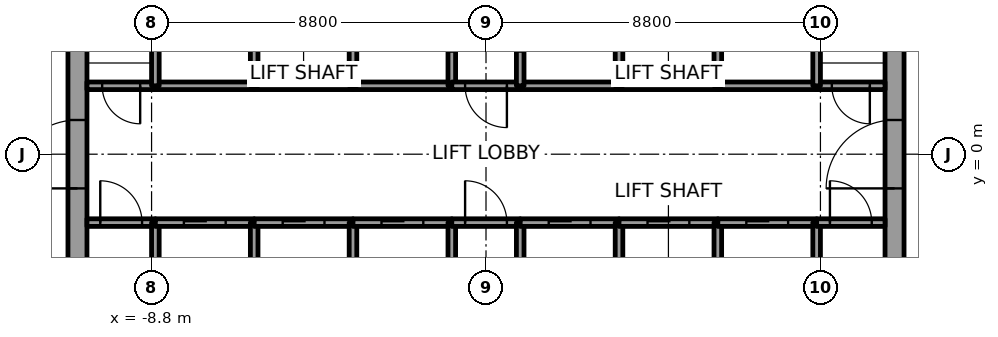
"""IFC4 building model, lengths in metres.
Left out: names, types, materials, properties, quantities, classifications, styles, units other than length and angle.
Written with IfcOpenShell. Run it as: python <this file> out.ifc"""

import sys

from ifc_helpers import new_model, si_unit, direction, frame, frame_2d, origin, place, context, subcontext, project, spatial, rectangle, extrude, element, fill, save


model = new_model("IFC4")
c1 = context("Model", 3, precision=1e-05, world=origin(), true_north=direction((0.0, 1.0)))
c2 = subcontext(c1, "Body", "Model", "MODEL_VIEW")
j1 = project(units=[si_unit("LENGTHUNIT", "METRE"), si_unit("PLANEANGLEUNIT", "RADIAN")], contexts=[c1])
p1 = place(None, origin())
s1 = spatial("IfcSite", under=j1, at=p1, CompositionType="ELEMENT")
p2 = place(p1, origin())
s2 = spatial("IfcBuilding", under=s1, at=p2, CompositionType="ELEMENT")
p3 = place(p2, frame((0.0, 0.0, 81.3)))
s3 = spatial("IfcBuildingStorey", under=s2, at=p3, CompositionType="ELEMENT", Elevation=81.3)
p4 = place(p3, frame((-10.75, -7.5, 0.0), z_axis=(0.0, 0.0, 1.0), x_axis=(0.0, 1.0, 0.0)))
e1 = element("IfcWall", 1, at=p4, inside=s3, PredefinedType="SHEAR", context=c2, shape_type="SweptSolid", body=[
    extrude(rectangle(XDim=15.0, YDim=0.5, at=frame_2d((7.5, 0.0))), origin(), (0.0, 0.0, 1.0), 3.7),
])
p5 = place(p4, frame((6.6, 0.0, 0.0)))
e2 = element("IfcOpeningElement", 2, at=p5, cuts=e1, PredefinedType="OPENING", context=c2, shape_type="SweptSolid", body=[
    extrude(rectangle(XDim=1.8, YDim=2.1, at=frame_2d((0.9, 1.05))), frame((0.0, 0.25, 0.0), z_axis=(0.0, -1.0, 0.0), x_axis=(1.0, 0.0, 0.0)), (0.0, 0.0, 1.0), 0.5),
])
p6 = place(p3, frame((10.75, -7.5, 0.0), z_axis=(0.0, 0.0, 1.0), x_axis=(0.0, 1.0, 0.0)))
e3 = element("IfcWall", 3, at=p6, inside=s3, PredefinedType="SHEAR", context=c2, shape_type="SweptSolid", body=[
    extrude(rectangle(XDim=15.0, YDim=0.5, at=frame_2d((7.5, 0.0))), origin(), (0.0, 0.0, 1.0), 3.7),
])
p7 = place(p6, frame((6.6, 0.0, 0.0)))
e4 = element("IfcOpeningElement", 4, at=p7, cuts=e3, PredefinedType="OPENING", context=c2, shape_type="SweptSolid", body=[
    extrude(rectangle(XDim=1.8, YDim=2.1, at=frame_2d((0.9, 1.05))), frame((0.0, 0.25, 0.0), z_axis=(0.0, -1.0, 0.0), x_axis=(1.0, 0.0, 0.0)), (0.0, 0.0, 1.0), 0.5),
])
p8 = place(p3, frame((-10.5, -1.8, 0.0), z_axis=(0.0, 0.0, 1.0), x_axis=(1.0, 0.0, 0.0)))
e5 = element("IfcWall", 5, at=p8, inside=s3, PredefinedType="SOLIDWALL", context=c2, shape_type="SweptSolid", body=[
    extrude(rectangle(XDim=1.8, YDim=0.2, at=frame_2d((0.9, 0.0))), origin(), (0.0, 0.0, 1.0), 3.55),
])
p9 = place(p8, frame((0.35, 0.0, 0.0)))
e6 = element("IfcOpeningElement", 6, at=p9, cuts=e5, PredefinedType="OPENING", context=c2, shape_type="SweptSolid", body=[
    extrude(rectangle(XDim=1.1, YDim=2.1, at=frame_2d((0.55, 1.05))), frame((0.0, 0.1, 0.0), z_axis=(0.0, -1.0, 0.0), x_axis=(1.0, 0.0, 0.0)), (0.0, 0.0, 1.0), 0.2),
])
p10 = place(p3, frame((-8.7, 1.8, 0.0), z_axis=(0.0, 0.0, 1.0), x_axis=(-1.0, 0.0, 0.0)))
e7 = element("IfcWall", 7, at=p10, inside=s3, PredefinedType="SOLIDWALL", context=c2, shape_type="SweptSolid", body=[
    extrude(rectangle(XDim=1.8, YDim=0.2, at=frame_2d((0.9, 0.0))), origin(), (0.0, 0.0, 1.0), 3.55),
])
p11 = place(p10, frame((0.4, 0.0, 0.0)))
e8 = element("IfcOpeningElement", 8, at=p11, cuts=e7, PredefinedType="OPENING", context=c2, shape_type="SweptSolid", body=[
    extrude(rectangle(XDim=1.0, YDim=2.1, at=frame_2d((0.5, 1.05))), frame((0.0, 0.1, 0.0), z_axis=(0.0, -1.0, 0.0), x_axis=(1.0, 0.0, 0.0)), (0.0, 0.0, 1.0), 0.2),
])
p12 = place(p3, frame((-8.7, -4.6, 0.0), z_axis=(0.0, 0.0, 1.0), x_axis=(0.0, 1.0, 0.0)))
e9 = element("IfcWall", 9, at=p12, inside=s3, PredefinedType="SOLIDWALL", context=c2, shape_type="SweptSolid", body=[
    extrude(rectangle(XDim=2.8, YDim=0.2, at=frame_2d((1.4, 0.0))), origin(), (0.0, 0.0, 1.0), 3.55),
])
p13 = place(p3, frame((-8.7, -1.8, 0.0), z_axis=(0.0, 0.0, 1.0), x_axis=(1.0, 0.0, 0.0)))
e10 = element("IfcWall", 10, at=p13, inside=s3, PredefinedType="SOLIDWALL", context=c2, shape_type="SweptSolid", body=[
    extrude(rectangle(XDim=2.6, YDim=0.2, at=frame_2d((1.3, 0.0))), origin(), (0.0, 0.0, 1.0), 3.55),
])
p14 = place(p13, frame((0.75, 0.0, 0.0)))
e11 = element("IfcOpeningElement", 11, at=p14, cuts=e10, PredefinedType="OPENING", context=c2, shape_type="SweptSolid", body=[
    extrude(rectangle(XDim=1.1, YDim=2.1, at=frame_2d((0.55, 1.05))), frame((0.0, 0.1, 0.0), z_axis=(0.0, -1.0, 0.0), x_axis=(1.0, 0.0, 0.0)), (0.0, 0.0, 1.0), 0.2),
])
p15 = place(p3, frame((-6.1, 1.8, 0.0), z_axis=(0.0, 0.0, 1.0), x_axis=(-1.0, 0.0, 0.0)))
e12 = element("IfcWall", 12, at=p15, inside=s3, PredefinedType="SOLIDWALL", context=c2, shape_type="SweptSolid", body=[
    extrude(rectangle(XDim=2.6, YDim=0.2, at=frame_2d((1.3, 0.0))), origin(), (0.0, 0.0, 1.0), 3.55),
])
for number, where, z_axis, x_axis in (
    (13, (-8.7, 1.8, 0.0), (0.0, 0.0, 1.0), (0.0, 1.0, 0.0)),
    (14, (-6.1, -4.6, 0.0), (0.0, 0.0, 1.0), (0.0, 1.0, 0.0)),
):
    element("IfcWall", number, at=place(p3, frame(where, z_axis=z_axis, x_axis=x_axis)), inside=s3, PredefinedType="SOLIDWALL", context=c2, shape_type="SweptSolid", body=[
        extrude(rectangle(XDim=2.8, YDim=0.2, at=frame_2d((1.4, 0.0))), origin(), (0.0, 0.0, 1.0), 3.55),
    ])
p16 = place(p3, frame((-6.1, -1.8, 0.0), z_axis=(0.0, 0.0, 1.0), x_axis=(1.0, 0.0, 0.0)))
e15 = element("IfcWall", 15, at=p16, inside=s3, PredefinedType="SOLIDWALL", context=c2, shape_type="SweptSolid", body=[
    extrude(rectangle(XDim=2.6, YDim=0.2, at=frame_2d((1.3, 0.0))), origin(), (0.0, 0.0, 1.0), 3.55),
])
p17 = place(p16, frame((0.75, 0.0, 0.0)))
e16 = element("IfcOpeningElement", 16, at=p17, cuts=e15, PredefinedType="OPENING", context=c2, shape_type="SweptSolid", body=[
    extrude(rectangle(XDim=1.1, YDim=2.1, at=frame_2d((0.55, 1.05))), frame((0.0, 0.1, 0.0), z_axis=(0.0, -1.0, 0.0), x_axis=(1.0, 0.0, 0.0)), (0.0, 0.0, 1.0), 0.2),
])
p18 = place(p3, frame((-3.5, 1.8, 0.0), z_axis=(0.0, 0.0, 1.0), x_axis=(-1.0, 0.0, 0.0)))
e17 = element("IfcWall", 17, at=p18, inside=s3, PredefinedType="SOLIDWALL", context=c2, shape_type="SweptSolid", body=[
    extrude(rectangle(XDim=2.6, YDim=0.2, at=frame_2d((1.3, 0.0))), origin(), (0.0, 0.0, 1.0), 3.55),
])
for number, where, z_axis, x_axis in (
    (18, (-6.1, 1.8, 0.0), (0.0, 0.0, 1.0), (0.0, 1.0, 0.0)),
    (19, (-3.5, -4.6, 0.0), (0.0, 0.0, 1.0), (0.0, 1.0, 0.0)),
):
    element("IfcWall", number, at=place(p3, frame(where, z_axis=z_axis, x_axis=x_axis)), inside=s3, PredefinedType="SOLIDWALL", context=c2, shape_type="SweptSolid", body=[
        extrude(rectangle(XDim=2.8, YDim=0.2, at=frame_2d((1.4, 0.0))), origin(), (0.0, 0.0, 1.0), 3.55),
    ])
p19 = place(p3, frame((-3.5, -1.8, 0.0), z_axis=(0.0, 0.0, 1.0), x_axis=(1.0, 0.0, 0.0)))
e20 = element("IfcWall", 20, at=p19, inside=s3, PredefinedType="SOLIDWALL", context=c2, shape_type="SweptSolid", body=[
    extrude(rectangle(XDim=2.6, YDim=0.2, at=frame_2d((1.3, 0.0))), origin(), (0.0, 0.0, 1.0), 3.55),
])
p20 = place(p19, frame((0.75, 0.0, 0.0)))
e21 = element("IfcOpeningElement", 21, at=p20, cuts=e20, PredefinedType="OPENING", context=c2, shape_type="SweptSolid", body=[
    extrude(rectangle(XDim=1.1, YDim=2.1, at=frame_2d((0.55, 1.05))), frame((0.0, 0.1, 0.0), z_axis=(0.0, -1.0, 0.0), x_axis=(1.0, 0.0, 0.0)), (0.0, 0.0, 1.0), 0.2),
])
p21 = place(p3, frame((-0.9, 1.8, 0.0), z_axis=(0.0, 0.0, 1.0), x_axis=(-1.0, 0.0, 0.0)))
e22 = element("IfcWall", 22, at=p21, inside=s3, PredefinedType="SOLIDWALL", context=c2, shape_type="SweptSolid", body=[
    extrude(rectangle(XDim=2.6, YDim=0.2, at=frame_2d((1.3, 0.0))), origin(), (0.0, 0.0, 1.0), 3.55),
])
p22 = place(p3, frame((-3.5, 4.6, 0.0), z_axis=(0.0, 0.0, 1.0), x_axis=(0.0, -1.0, 0.0)))
e23 = element("IfcWall", 23, at=p22, inside=s3, PredefinedType="SOLIDWALL", context=c2, shape_type="SweptSolid", body=[
    extrude(rectangle(XDim=2.8, YDim=0.2, at=frame_2d((1.4, 0.0))), origin(), (0.0, 0.0, 1.0), 3.55),
])
p23 = place(p3, frame((-0.9, 1.8, 0.0), z_axis=(0.0, 0.0, 1.0), x_axis=(0.0, 1.0, 0.0)))
e24 = element("IfcWall", 24, at=p23, inside=s3, PredefinedType="SOLIDWALL", context=c2, shape_type="SweptSolid", body=[
    extrude(rectangle(XDim=3.0, YDim=0.2, at=frame_2d((1.5, 0.0))), origin(), (0.0, 0.0, 1.0), 3.55),
])
p24 = place(p23, frame((0.9, 0.0, 0.0)))
e25 = element("IfcOpeningElement", 25, at=p24, cuts=e24, PredefinedType="OPENING", context=c2, shape_type="SweptSolid", body=[
    extrude(rectangle(XDim=1.2, YDim=2.1, at=frame_2d((0.6, 1.05))), frame((0.0, 0.1, 0.0), z_axis=(0.0, -1.0, 0.0), x_axis=(1.0, 0.0, 0.0)), (0.0, 0.0, 1.0), 0.2),
])
p25 = place(p3, frame((-0.9, -4.6, 0.0), z_axis=(0.0, 0.0, 1.0), x_axis=(0.0, 1.0, 0.0)))
e26 = element("IfcWall", 26, at=p25, inside=s3, PredefinedType="SOLIDWALL", context=c2, shape_type="SweptSolid", body=[
    extrude(rectangle(XDim=2.8, YDim=0.2, at=frame_2d((1.4, 0.0))), origin(), (0.0, 0.0, 1.0), 3.55),
])
p26 = place(p3, frame((-0.9, -1.8, 0.0), z_axis=(0.0, 0.0, 1.0), x_axis=(1.0, 0.0, 0.0)))
e27 = element("IfcWall", 27, at=p26, inside=s3, PredefinedType="SOLIDWALL", context=c2, shape_type="SweptSolid", body=[
    extrude(rectangle(XDim=1.8, YDim=0.2, at=frame_2d((0.9, 0.0))), origin(), (0.0, 0.0, 1.0), 3.55),
])
p27 = place(p26, frame((0.35, 0.0, 0.0)))
e28 = element("IfcOpeningElement", 28, at=p27, cuts=e27, PredefinedType="OPENING", context=c2, shape_type="SweptSolid", body=[
    extrude(rectangle(XDim=1.1, YDim=2.1, at=frame_2d((0.55, 1.05))), frame((0.0, 0.1, 0.0), z_axis=(0.0, -1.0, 0.0), x_axis=(1.0, 0.0, 0.0)), (0.0, 0.0, 1.0), 0.2),
])
p28 = place(p3, frame((0.9, 1.8, 0.0), z_axis=(0.0, 0.0, 1.0), x_axis=(-1.0, 0.0, 0.0)))
e29 = element("IfcWall", 29, at=p28, inside=s3, PredefinedType="SOLIDWALL", context=c2, shape_type="SweptSolid", body=[
    extrude(rectangle(XDim=1.8, YDim=0.2, at=frame_2d((0.9, 0.0))), origin(), (0.0, 0.0, 1.0), 3.55),
])
p29 = place(p28, frame((0.35, 0.0, 0.0)))
e30 = element("IfcOpeningElement", 30, at=p29, cuts=e29, PredefinedType="OPENING", context=c2, shape_type="SweptSolid", body=[
    extrude(rectangle(XDim=1.1, YDim=2.1, at=frame_2d((0.55, 1.05))), frame((0.0, 0.1, 0.0), z_axis=(0.0, -1.0, 0.0), x_axis=(1.0, 0.0, 0.0)), (0.0, 0.0, 1.0), 0.2),
])
p30 = place(p3, frame((0.9, -1.8, 0.0), z_axis=(0.0, 0.0, 1.0), x_axis=(0.0, -1.0, 0.0)))
e31 = element("IfcWall", 31, at=p30, inside=s3, PredefinedType="SOLIDWALL", context=c2, shape_type="SweptSolid", body=[
    extrude(rectangle(XDim=2.8, YDim=0.2, at=frame_2d((1.4, 0.0))), origin(), (0.0, 0.0, 1.0), 3.55),
])
p31 = place(p3, frame((0.9, -1.8, 0.0), z_axis=(0.0, 0.0, 1.0), x_axis=(1.0, 0.0, 0.0)))
e32 = element("IfcWall", 32, at=p31, inside=s3, PredefinedType="SOLIDWALL", context=c2, shape_type="SweptSolid", body=[
    extrude(rectangle(XDim=2.6, YDim=0.2, at=frame_2d((1.3, 0.0))), origin(), (0.0, 0.0, 1.0), 3.55),
])
p32 = place(p31, frame((0.75, 0.0, 0.0)))
e33 = element("IfcOpeningElement", 33, at=p32, cuts=e32, PredefinedType="OPENING", context=c2, shape_type="SweptSolid", body=[
    extrude(rectangle(XDim=1.1, YDim=2.1, at=frame_2d((0.55, 1.05))), frame((0.0, 0.1, 0.0), z_axis=(0.0, -1.0, 0.0), x_axis=(1.0, 0.0, 0.0)), (0.0, 0.0, 1.0), 0.2),
])
p33 = place(p3, frame((3.5, 1.8, 0.0), z_axis=(0.0, 0.0, 1.0), x_axis=(-1.0, 0.0, 0.0)))
e34 = element("IfcWall", 34, at=p33, inside=s3, PredefinedType="SOLIDWALL", context=c2, shape_type="SweptSolid", body=[
    extrude(rectangle(XDim=2.6, YDim=0.2, at=frame_2d((1.3, 0.0))), origin(), (0.0, 0.0, 1.0), 3.55),
])
p34 = place(p3, frame((0.9, 4.8, 0.0), z_axis=(0.0, 0.0, 1.0), x_axis=(0.0, -1.0, 0.0)))
e35 = element("IfcWall", 35, at=p34, inside=s3, PredefinedType="SOLIDWALL", context=c2, shape_type="SweptSolid", body=[
    extrude(rectangle(XDim=3.0, YDim=0.2, at=frame_2d((1.5, 0.0))), origin(), (0.0, 0.0, 1.0), 3.55),
])
p35 = place(p34, frame((0.9, 0.0, 0.0)))
e36 = element("IfcOpeningElement", 36, at=p35, cuts=e35, PredefinedType="OPENING", context=c2, shape_type="SweptSolid", body=[
    extrude(rectangle(XDim=1.2, YDim=2.1, at=frame_2d((0.6, 1.05))), frame((0.0, 0.1, 0.0), z_axis=(0.0, -1.0, 0.0), x_axis=(1.0, 0.0, 0.0)), (0.0, 0.0, 1.0), 0.2),
])
p36 = place(p3, frame((3.5, -4.6, 0.0), z_axis=(0.0, 0.0, 1.0), x_axis=(0.0, 1.0, 0.0)))
e37 = element("IfcWall", 37, at=p36, inside=s3, PredefinedType="SOLIDWALL", context=c2, shape_type="SweptSolid", body=[
    extrude(rectangle(XDim=2.8, YDim=0.2, at=frame_2d((1.4, 0.0))), origin(), (0.0, 0.0, 1.0), 3.55),
])
p37 = place(p3, frame((3.5, -1.8, 0.0), z_axis=(0.0, 0.0, 1.0), x_axis=(1.0, 0.0, 0.0)))
e38 = element("IfcWall", 38, at=p37, inside=s3, PredefinedType="SOLIDWALL", context=c2, shape_type="SweptSolid", body=[
    extrude(rectangle(XDim=2.6, YDim=0.2, at=frame_2d((1.3, 0.0))), origin(), (0.0, 0.0, 1.0), 3.55),
])
p38 = place(p37, frame((0.75, 0.0, 0.0)))
e39 = element("IfcOpeningElement", 39, at=p38, cuts=e38, PredefinedType="OPENING", context=c2, shape_type="SweptSolid", body=[
    extrude(rectangle(XDim=1.1, YDim=2.1, at=frame_2d((0.55, 1.05))), frame((0.0, 0.1, 0.0), z_axis=(0.0, -1.0, 0.0), x_axis=(1.0, 0.0, 0.0)), (0.0, 0.0, 1.0), 0.2),
])
p39 = place(p3, frame((6.1, 1.8, 0.0), z_axis=(0.0, 0.0, 1.0), x_axis=(-1.0, 0.0, 0.0)))
e40 = element("IfcWall", 40, at=p39, inside=s3, PredefinedType="SOLIDWALL", context=c2, shape_type="SweptSolid", body=[
    extrude(rectangle(XDim=2.6, YDim=0.2, at=frame_2d((1.3, 0.0))), origin(), (0.0, 0.0, 1.0), 3.55),
])
for number, where, z_axis, x_axis in (
    (41, (3.5, 1.8, 0.0), (0.0, 0.0, 1.0), (0.0, 1.0, 0.0)),
    (42, (6.1, -4.6, 0.0), (0.0, 0.0, 1.0), (0.0, 1.0, 0.0)),
):
    element("IfcWall", number, at=place(p3, frame(where, z_axis=z_axis, x_axis=x_axis)), inside=s3, PredefinedType="SOLIDWALL", context=c2, shape_type="SweptSolid", body=[
        extrude(rectangle(XDim=2.8, YDim=0.2, at=frame_2d((1.4, 0.0))), origin(), (0.0, 0.0, 1.0), 3.55),
    ])
p40 = place(p3, frame((6.1, -1.8, 0.0), z_axis=(0.0, 0.0, 1.0), x_axis=(1.0, 0.0, 0.0)))
e43 = element("IfcWall", 43, at=p40, inside=s3, PredefinedType="SOLIDWALL", context=c2, shape_type="SweptSolid", body=[
    extrude(rectangle(XDim=2.6, YDim=0.2, at=frame_2d((1.3, 0.0))), origin(), (0.0, 0.0, 1.0), 3.55),
])
p41 = place(p40, frame((0.75, 0.0, 0.0)))
e44 = element("IfcOpeningElement", 44, at=p41, cuts=e43, PredefinedType="OPENING", context=c2, shape_type="SweptSolid", body=[
    extrude(rectangle(XDim=1.1, YDim=2.1, at=frame_2d((0.55, 1.05))), frame((0.0, 0.1, 0.0), z_axis=(0.0, -1.0, 0.0), x_axis=(1.0, 0.0, 0.0)), (0.0, 0.0, 1.0), 0.2),
])
p42 = place(p3, frame((8.7, 1.8, 0.0), z_axis=(0.0, 0.0, 1.0), x_axis=(-1.0, 0.0, 0.0)))
e45 = element("IfcWall", 45, at=p42, inside=s3, PredefinedType="SOLIDWALL", context=c2, shape_type="SweptSolid", body=[
    extrude(rectangle(XDim=2.6, YDim=0.2, at=frame_2d((1.3, 0.0))), origin(), (0.0, 0.0, 1.0), 3.55),
])
for number, where, z_axis, x_axis in (
    (46, (6.1, 1.8, 0.0), (0.0, 0.0, 1.0), (0.0, 1.0, 0.0)),
    (47, (8.7, -1.8, 0.0), (0.0, 0.0, 1.0), (0.0, -1.0, 0.0)),
):
    element("IfcWall", number, at=place(p3, frame(where, z_axis=z_axis, x_axis=x_axis)), inside=s3, PredefinedType="SOLIDWALL", context=c2, shape_type="SweptSolid", body=[
        extrude(rectangle(XDim=2.8, YDim=0.2, at=frame_2d((1.4, 0.0))), origin(), (0.0, 0.0, 1.0), 3.55),
    ])
p43 = place(p3, frame((8.7, -1.8, 0.0), z_axis=(0.0, 0.0, 1.0), x_axis=(1.0, 0.0, 0.0)))
e48 = element("IfcWall", 48, at=p43, inside=s3, PredefinedType="SOLIDWALL", context=c2, shape_type="SweptSolid", body=[
    extrude(rectangle(XDim=1.8, YDim=0.2, at=frame_2d((0.9, 0.0))), origin(), (0.0, 0.0, 1.0), 3.55),
])
p44 = place(p43, frame((0.35, 0.0, 0.0)))
e49 = element("IfcOpeningElement", 49, at=p44, cuts=e48, PredefinedType="OPENING", context=c2, shape_type="SweptSolid", body=[
    extrude(rectangle(XDim=1.1, YDim=2.1, at=frame_2d((0.55, 1.05))), frame((0.0, 0.1, 0.0), z_axis=(0.0, -1.0, 0.0), x_axis=(1.0, 0.0, 0.0)), (0.0, 0.0, 1.0), 0.2),
])
p45 = place(p3, frame((10.5, 1.8, 0.0), z_axis=(0.0, 0.0, 1.0), x_axis=(-1.0, 0.0, 0.0)))
e50 = element("IfcWall", 50, at=p45, inside=s3, PredefinedType="SOLIDWALL", context=c2, shape_type="SweptSolid", body=[
    extrude(rectangle(XDim=1.8, YDim=0.2, at=frame_2d((0.9, 0.0))), origin(), (0.0, 0.0, 1.0), 3.55),
])
p46 = place(p45, frame((0.4, 0.0, 0.0)))
e51 = element("IfcOpeningElement", 51, at=p46, cuts=e50, PredefinedType="OPENING", context=c2, shape_type="SweptSolid", body=[
    extrude(rectangle(XDim=1.0, YDim=2.1, at=frame_2d((0.5, 1.05))), frame((0.0, 0.1, 0.0), z_axis=(0.0, -1.0, 0.0), x_axis=(1.0, 0.0, 0.0)), (0.0, 0.0, 1.0), 0.2),
])
p47 = place(p3, frame((8.7, 4.6, 0.0), z_axis=(0.0, 0.0, 1.0), x_axis=(0.0, -1.0, 0.0)))
e52 = element("IfcWall", 52, at=p47, inside=s3, PredefinedType="SOLIDWALL", context=c2, shape_type="SweptSolid", body=[
    extrude(rectangle(XDim=2.8, YDim=0.2, at=frame_2d((1.4, 0.0))), origin(), (0.0, 0.0, 1.0), 3.55),
])
p48 = place(p14, origin())
e53 = element("IfcDoor", 53, at=p48, inside=s3, OperationType="SLIDING_TO_RIGHT", PredefinedType="DOOR", context=c2, shape_type="SweptSolid", body=[
    extrude(rectangle(XDim=1.1, YDim=2.1, at=frame_2d((0.55, 1.05))), frame((0.0, 0.025, 0.0), z_axis=(0.0, -1.0, 0.0), x_axis=(1.0, 0.0, 0.0)), (0.0, 0.0, 1.0), 0.05),
])
fill(e11, e53)
p49 = place(p17, origin())
e54 = element("IfcDoor", 54, at=p49, inside=s3, OperationType="SLIDING_TO_LEFT", PredefinedType="DOOR", context=c2, shape_type="SweptSolid", body=[
    extrude(rectangle(XDim=1.1, YDim=2.1, at=frame_2d((0.55, 1.05))), frame((0.0, 0.025, 0.0), z_axis=(0.0, -1.0, 0.0), x_axis=(1.0, 0.0, 0.0)), (0.0, 0.0, 1.0), 0.05),
])
fill(e16, e54)
p50 = place(p20, origin())
e55 = element("IfcDoor", 55, at=p50, inside=s3, OperationType="SLIDING_TO_LEFT", PredefinedType="DOOR", context=c2, shape_type="SweptSolid", body=[
    extrude(rectangle(XDim=1.1, YDim=2.1, at=frame_2d((0.55, 1.05))), frame((0.0, 0.025, 0.0), z_axis=(0.0, -1.0, 0.0), x_axis=(1.0, 0.0, 0.0)), (0.0, 0.0, 1.0), 0.05),
])
fill(e21, e55)
p51 = place(p32, origin())
e56 = element("IfcDoor", 56, at=p51, inside=s3, OperationType="SLIDING_TO_RIGHT", PredefinedType="DOOR", context=c2, shape_type="SweptSolid", body=[
    extrude(rectangle(XDim=1.1, YDim=2.1, at=frame_2d((0.55, 1.05))), frame((0.0, 0.025, 0.0), z_axis=(0.0, -1.0, 0.0), x_axis=(1.0, 0.0, 0.0)), (0.0, 0.0, 1.0), 0.05),
])
fill(e33, e56)
p52 = place(p38, origin())
e57 = element("IfcDoor", 57, at=p52, inside=s3, OperationType="SLIDING_TO_LEFT", PredefinedType="DOOR", context=c2, shape_type="SweptSolid", body=[
    extrude(rectangle(XDim=1.1, YDim=2.1, at=frame_2d((0.55, 1.05))), frame((0.0, 0.025, 0.0), z_axis=(0.0, -1.0, 0.0), x_axis=(1.0, 0.0, 0.0)), (0.0, 0.0, 1.0), 0.05),
])
fill(e39, e57)
p53 = place(p41, origin())
e58 = element("IfcDoor", 58, at=p53, inside=s3, OperationType="SLIDING_TO_RIGHT", PredefinedType="DOOR", context=c2, shape_type="SweptSolid", body=[
    extrude(rectangle(XDim=1.1, YDim=2.1, at=frame_2d((0.55, 1.05))), frame((0.0, 0.025, 0.0), z_axis=(0.0, -1.0, 0.0), x_axis=(1.0, 0.0, 0.0)), (0.0, 0.0, 1.0), 0.05),
])
fill(e44, e58)
p54 = place(p9, origin())
e59 = element("IfcDoor", 59, at=p54, inside=s3, OperationType="SINGLE_SWING_LEFT", PredefinedType="DOOR", context=c2, shape_type="SweptSolid", body=[
    extrude(rectangle(XDim=1.1, YDim=2.1, at=frame_2d((0.55, 1.05))), frame((0.0, 0.025, 0.0), z_axis=(0.0, -1.0, 0.0), x_axis=(1.0, 0.0, 0.0)), (0.0, 0.0, 1.0), 0.05),
])
fill(e6, e59)
p55 = place(p44, origin())
e60 = element("IfcDoor", 60, at=p55, inside=s3, OperationType="SINGLE_SWING_LEFT", PredefinedType="DOOR", context=c2, shape_type="SweptSolid", body=[
    extrude(rectangle(XDim=1.1, YDim=2.1, at=frame_2d((0.55, 1.05))), frame((0.0, 0.025, 0.0), z_axis=(0.0, -1.0, 0.0), x_axis=(1.0, 0.0, 0.0)), (0.0, 0.0, 1.0), 0.05),
])
fill(e49, e60)
p56 = place(p29, origin())
e61 = element("IfcDoor", 61, at=p56, inside=s3, OperationType="SINGLE_SWING_RIGHT", PredefinedType="DOOR", context=c2, shape_type="SweptSolid", body=[
    extrude(rectangle(XDim=1.1, YDim=2.1, at=frame_2d((0.55, 1.05))), frame((0.0, 0.025, 0.0), z_axis=(0.0, -1.0, 0.0), x_axis=(1.0, 0.0, 0.0)), (0.0, 0.0, 1.0), 0.05),
])
fill(e30, e61)
p57 = place(p27, origin())
e62 = element("IfcDoor", 62, at=p57, inside=s3, OperationType="SINGLE_SWING_RIGHT", PredefinedType="DOOR", context=c2, shape_type="SweptSolid", body=[
    extrude(rectangle(XDim=1.1, YDim=2.1, at=frame_2d((0.55, 1.05))), frame((0.0, 0.025, 0.0), z_axis=(0.0, -1.0, 0.0), x_axis=(1.0, 0.0, 0.0)), (0.0, 0.0, 1.0), 0.05),
])
fill(e28, e62)
p58 = place(p11, origin())
e63 = element("IfcDoor", 63, at=p58, inside=s3, OperationType="SINGLE_SWING_RIGHT", PredefinedType="DOOR", context=c2, shape_type="SweptSolid", body=[
    extrude(rectangle(XDim=1.0, YDim=2.1, at=frame_2d((0.5, 1.05))), frame((0.0, 0.025, 0.0), z_axis=(0.0, -1.0, 0.0), x_axis=(1.0, 0.0, 0.0)), (0.0, 0.0, 1.0), 0.05),
])
fill(e8, e63)
p59 = place(p46, origin())
e64 = element("IfcDoor", 64, at=p59, inside=s3, OperationType="SINGLE_SWING_RIGHT", PredefinedType="DOOR", context=c2, shape_type="SweptSolid", body=[
    extrude(rectangle(XDim=1.0, YDim=2.1, at=frame_2d((0.5, 1.05))), frame((0.0, 0.025, 0.0), z_axis=(0.0, -1.0, 0.0), x_axis=(1.0, 0.0, 0.0)), (0.0, 0.0, 1.0), 0.05),
])
fill(e51, e64)
p60 = place(p5, origin())
e65 = element("IfcDoor", 65, at=p60, inside=s3, OperationType="DOUBLE_DOOR_SINGLE_SWING", PredefinedType="DOOR", context=c2, shape_type="SweptSolid", body=[
    extrude(rectangle(XDim=1.8, YDim=2.1, at=frame_2d((0.9, 1.05))), frame((0.0, 0.025, 0.0), z_axis=(0.0, -1.0, 0.0), x_axis=(1.0, 0.0, 0.0)), (0.0, 0.0, 1.0), 0.05),
])
fill(e2, e65)
p61 = place(p7, origin())
e66 = element("IfcDoor", 66, at=p61, inside=s3, OperationType="DOUBLE_DOOR_SINGLE_SWING", PredefinedType="DOOR", context=c2, shape_type="SweptSolid", body=[
    extrude(rectangle(XDim=1.8, YDim=2.1, at=frame_2d((0.9, 1.05))), frame((0.0, 0.025, 0.0), z_axis=(0.0, -1.0, 0.0), x_axis=(1.0, 0.0, 0.0)), (0.0, 0.0, 1.0), 0.05),
])
fill(e4, e66)
save(model, sys.argv[1])
